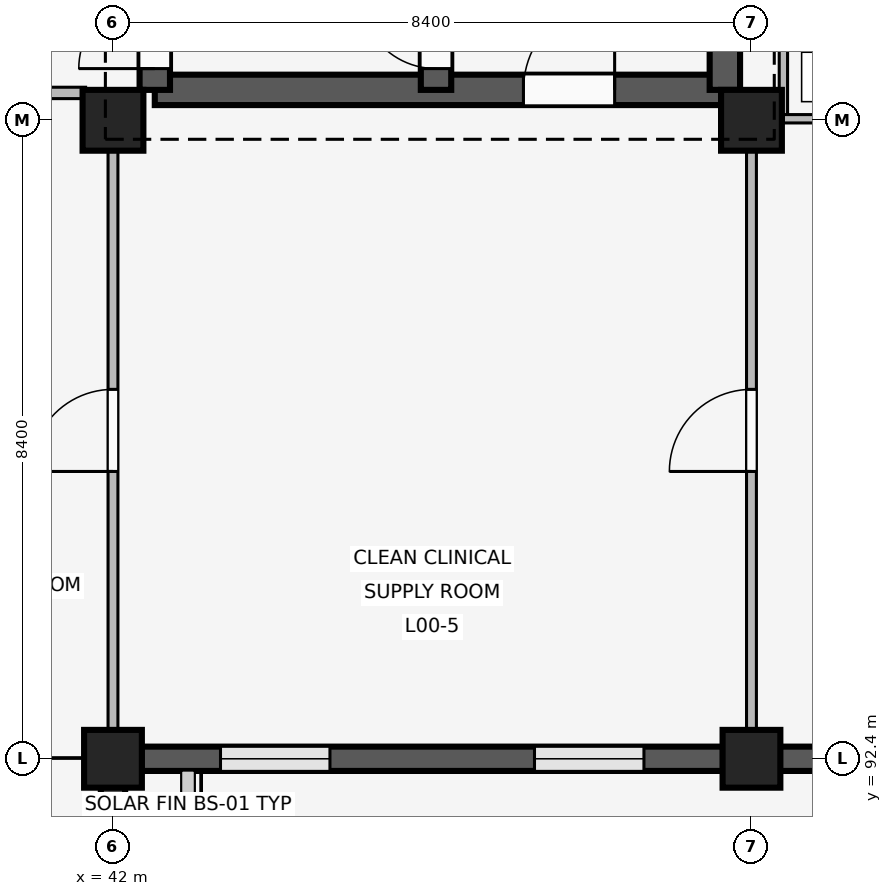
"""IFC4 building model, lengths in metres.
Left out: names, types, materials, properties, quantities, classifications, styles, units other than length and angle.
Written with IfcOpenShell. Run it as: python <this file> out.ifc"""

import sys

from ifc_helpers import new_model, si_unit, direction, frame, frame_2d, origin, origin_2d, place, context, subcontext, project, spatial, rectangle, extrude, element, fill, save


model = new_model("IFC4")
c1 = context("Model", 3, precision=1e-05, world=origin(), true_north=direction((0.0, 1.0)))
c2 = subcontext(c1, "Body", "Model", "MODEL_VIEW")
j1 = project(units=[si_unit("LENGTHUNIT", "METRE"), si_unit("PLANEANGLEUNIT", "RADIAN")], contexts=[c1])
p1 = place(None, origin())
s1 = spatial("IfcSite", under=j1, at=p1, CompositionType="ELEMENT")
p2 = place(p1, origin())
s2 = spatial("IfcBuilding", under=s1, at=p2, CompositionType="ELEMENT")
p3 = place(p2, origin())
s3 = spatial("IfcBuildingStorey", under=s2, at=p3, CompositionType="ELEMENT", Elevation=0.0)
p4 = place(p3, frame((42.0, 92.4, 0.0), z_axis=(0.0, 0.0, 1.0), x_axis=(1.0, 0.0, 0.0)))
e1 = element("IfcColumn", 1, at=p4, inside=s3, PredefinedType="COLUMN", context=c2, shape_type="SweptSolid", body=[
    extrude(rectangle(XDim=0.76, YDim=0.76, at=origin_2d()), origin(), (0.0, 0.0, 1.0), 4.8),
])
p5 = place(p3, frame((42.0, 100.8, 0.0), z_axis=(0.0, 0.0, 1.0), x_axis=(1.0, 0.0, 0.0)))
e2 = element("IfcColumn", 2, at=p5, inside=s3, PredefinedType="COLUMN", context=c2, shape_type="SweptSolid", body=[
    extrude(rectangle(XDim=0.8, YDim=0.8, at=origin_2d()), origin(), (0.0, 0.0, 1.0), 4.8),
])
p6 = place(p3, frame((50.4, 92.4, 0.0), z_axis=(0.0, 0.0, 1.0), x_axis=(1.0, 0.0, 0.0)))
e3 = element("IfcColumn", 3, at=p6, inside=s3, PredefinedType="COLUMN", context=c2, shape_type="SweptSolid", body=[
    extrude(rectangle(XDim=0.76, YDim=0.76, at=origin_2d()), origin(), (0.0, 0.0, 1.0), 4.8),
])
p7 = place(p3, frame((50.4, 100.8, 0.0), z_axis=(0.0, 0.0, 1.0), x_axis=(1.0, 0.0, 0.0)))
e4 = element("IfcColumn", 4, at=p7, inside=s3, PredefinedType="COLUMN", context=c2, shape_type="SweptSolid", body=[
    extrude(rectangle(XDim=0.8, YDim=0.8, at=origin_2d()), origin(), (0.0, 0.0, 1.0), 4.8),
])
p8 = place(p3, frame((42.0, 92.025, 0.0), z_axis=(0.0, 0.0, 1.0), x_axis=(0.0, -1.0, 0.0)))
e5 = element("IfcWall", 5, at=p8, inside=s3, PredefinedType="SOLIDWALL", context=c2, shape_type="SweptSolid", body=[
    extrude(rectangle(XDim=7.65, YDim=0.32, at=frame_2d((3.825, 0.0))), origin(), (0.0, 0.0, 1.0), 3.82),
])
p9 = place(p8, frame((0.979, 0.0, 0.85)))
e6 = element("IfcOpeningElement", 6, at=p9, cuts=e5, PredefinedType="OPENING", context=c2, shape_type="SweptSolid", body=[
    extrude(rectangle(XDim=1.56, YDim=1.7, at=frame_2d((0.78, 0.85))), frame((0.0, 0.17, 0.0), z_axis=(0.0, -1.0, 0.0), x_axis=(1.0, 0.0, 0.0)), (0.0, 0.0, 1.0), 0.34),
])
p10 = place(p8, frame((5.111, 0.0, 0.85)))
e7 = element("IfcOpeningElement", 7, at=p10, cuts=e5, PredefinedType="OPENING", context=c2, shape_type="SweptSolid", body=[
    extrude(rectangle(XDim=1.56, YDim=1.7, at=frame_2d((0.78, 0.85))), frame((0.0, 0.17, 0.0), z_axis=(0.0, -1.0, 0.0), x_axis=(1.0, 0.0, 0.0)), (0.0, 0.0, 1.0), 0.34),
])
p11 = place(p3, frame((50.025, 92.4, 0.0), z_axis=(0.0, 0.0, 1.0), x_axis=(-1.0, 0.0, 0.0)))
e8 = element("IfcWall", 8, at=p11, inside=s3, PredefinedType="SOLIDWALL", context=c2, shape_type="SweptSolid", body=[
    extrude(rectangle(XDim=7.65, YDim=0.32, at=frame_2d((3.825, 0.0))), origin(), (0.0, 0.0, 1.0), 3.82),
])
p12 = place(p11, frame((1.04, 0.0, 0.85)))
e9 = element("IfcOpeningElement", 9, at=p12, cuts=e8, PredefinedType="OPENING", context=c2, shape_type="SweptSolid", body=[
    extrude(rectangle(XDim=1.44, YDim=1.62, at=frame_2d((0.72, 0.81))), frame((0.0, 0.17, 0.0), z_axis=(0.0, -1.0, 0.0), x_axis=(1.0, 0.0, 0.0)), (0.0, 0.0, 1.0), 0.34),
])
p13 = place(p11, frame((5.17, 0.0, 0.85)))
e10 = element("IfcOpeningElement", 10, at=p13, cuts=e8, PredefinedType="OPENING", context=c2, shape_type="SweptSolid", body=[
    extrude(rectangle(XDim=1.44, YDim=1.62, at=frame_2d((0.72, 0.81))), frame((0.0, 0.17, 0.0), z_axis=(0.0, -1.0, 0.0), x_axis=(1.0, 0.0, 0.0)), (0.0, 0.0, 1.0), 0.34),
])
p14 = place(p3, frame((58.425, 92.4, 0.0), z_axis=(0.0, 0.0, 1.0), x_axis=(-1.0, 0.0, 0.0)))
e11 = element("IfcWall", 11, at=p14, inside=s3, PredefinedType="SOLIDWALL", context=c2, shape_type="SweptSolid", body=[
    extrude(rectangle(XDim=7.65, YDim=0.32, at=frame_2d((3.825, 0.0))), origin(), (0.0, 0.0, 1.0), 3.82),
])
p15 = place(p14, frame((1.1, 0.0, 0.85)))
e12 = element("IfcOpeningElement", 12, at=p15, cuts=e11, PredefinedType="OPENING", context=c2, shape_type="SweptSolid", body=[
    extrude(rectangle(XDim=1.32, YDim=1.58, at=frame_2d((0.66, 0.79))), frame((0.0, 0.17, 0.0), z_axis=(0.0, -1.0, 0.0), x_axis=(1.0, 0.0, 0.0)), (0.0, 0.0, 1.0), 0.34),
])
p16 = place(p14, frame((5.23, 0.0, 0.85)))
e13 = element("IfcOpeningElement", 13, at=p16, cuts=e11, PredefinedType="OPENING", context=c2, shape_type="SweptSolid", body=[
    extrude(rectangle(XDim=1.32, YDim=1.58, at=frame_2d((0.66, 0.79))), frame((0.0, 0.17, 0.0), z_axis=(0.0, -1.0, 0.0), x_axis=(1.0, 0.0, 0.0)), (0.0, 0.0, 1.0), 0.34),
])
p17 = place(p3, frame((42.55, 101.2, 0.0), z_axis=(0.0, 0.0, 1.0), x_axis=(1.0, 0.0, 0.0)))
e14 = element("IfcWall", 14, at=p17, inside=s3, PredefinedType="SHEAR", context=c2, shape_type="SweptSolid", body=[
    extrude(rectangle(XDim=7.5, YDim=0.4, at=frame_2d((3.75, 0.0))), origin(), (0.0, 0.0, 1.0), 4.52),
])
p18 = place(p17, frame((4.85, 0.0, 0.0)))
e15 = element("IfcOpeningElement", 15, at=p18, cuts=e14, PredefinedType="OPENING", context=c2, shape_type="SweptSolid", body=[
    extrude(rectangle(XDim=1.2, YDim=2.2, at=frame_2d((0.6, 1.1))), frame((0.0, 0.21, 0.0), z_axis=(0.0, -1.0, 0.0), x_axis=(1.0, 0.0, 0.0)), (0.0, 0.0, 1.0), 0.42),
])
p19 = place(p3, frame((42.55, 101.2, 0.0), z_axis=(0.0, 0.0, 1.0), x_axis=(0.0, 1.0, 0.0)))
e16 = element("IfcWall", 16, at=p19, inside=s3, PredefinedType="SHEAR", context=c2, shape_type="SweptSolid", body=[
    extrude(rectangle(XDim=7.55, YDim=0.4, at=frame_2d((3.775, 0.0))), origin(), (0.0, 0.0, 1.0), 4.52),
])
p20 = place(p19, frame((0.28, 0.0, 0.0)))
e17 = element("IfcOpeningElement", 17, at=p20, cuts=e16, PredefinedType="OPENING", context=c2, shape_type="SweptSolid", body=[
    extrude(rectangle(XDim=1.0, YDim=2.15, at=frame_2d((0.5, 1.075))), frame((0.0, 0.21, 0.0), z_axis=(0.0, -1.0, 0.0), x_axis=(1.0, 0.0, 0.0)), (0.0, 0.0, 1.0), 0.42),
])
p21 = place(p3, frame((50.05, 101.2, 0.0), z_axis=(0.0, 0.0, 1.0), x_axis=(0.0, 1.0, 0.0)))
e18 = element("IfcWall", 18, at=p21, inside=s3, PredefinedType="SHEAR", context=c2, shape_type="SweptSolid", body=[
    extrude(rectangle(XDim=7.55, YDim=0.4, at=frame_2d((3.775, 0.0))), origin(), (0.0, 0.0, 1.0), 4.52),
])
p22 = place(p21, frame((2.4, 0.0, 0.0)))
e19 = element("IfcOpeningElement", 19, at=p22, cuts=e18, PredefinedType="OPENING", context=c2, shape_type="SweptSolid", body=[
    extrude(rectangle(XDim=1.2, YDim=2.2, at=frame_2d((0.6, 1.1))), frame((0.0, 0.21, 0.0), z_axis=(0.0, -1.0, 0.0), x_axis=(1.0, 0.0, 0.0)), (0.0, 0.0, 1.0), 0.42),
])
p23 = place(p3, frame((46.25, 101.2, 0.0), z_axis=(0.0, 0.0, 1.0), x_axis=(0.0, 1.0, 0.0)))
e20 = element("IfcWall", 20, at=p23, inside=s3, PredefinedType="SHEAR", context=c2, shape_type="SweptSolid", body=[
    extrude(rectangle(XDim=7.55, YDim=0.4, at=frame_2d((3.775, 0.0))), origin(), (0.0, 0.0, 1.0), 4.52),
])
p24 = place(p23, frame((0.28, 0.0, 0.0)))
e21 = element("IfcOpeningElement", 21, at=p24, cuts=e20, PredefinedType="OPENING", context=c2, shape_type="SweptSolid", body=[
    extrude(rectangle(XDim=1.0, YDim=2.15, at=frame_2d((0.5, 1.075))), frame((0.0, 0.21, 0.0), z_axis=(0.0, -1.0, 0.0), x_axis=(1.0, 0.0, 0.0)), (0.0, 0.0, 1.0), 0.42),
])
p25 = place(p3, frame((39.46, 101.16, 0.0), z_axis=(0.0, 0.0, 1.0), x_axis=(1.0, 0.0, 0.0)))
e22 = element("IfcWall", 22, at=p25, inside=s3, PredefinedType="PARTITIONING", context=c2, shape_type="SweptSolid", body=[
    extrude(rectangle(XDim=2.18, YDim=0.15, at=frame_2d((1.09, 0.0))), origin(), (0.0, 0.0, 1.0), 3.8),
])
p26 = place(p25, frame((0.5, 0.0, 0.0)))
e23 = element("IfcOpeningElement", 23, at=p26, cuts=e22, PredefinedType="OPENING", context=c2, shape_type="SweptSolid", body=[
    extrude(rectangle(XDim=1.08, YDim=2.15, at=frame_2d((0.54, 1.075))), frame((0.0, 0.085, 0.0), z_axis=(0.0, -1.0, 0.0), x_axis=(1.0, 0.0, 0.0)), (0.0, 0.0, 1.0), 0.17),
])
p27 = place(p3, frame((42.0, 92.54, 0.0), z_axis=(0.0, 0.0, 1.0), x_axis=(0.0, 1.0, 0.0)))
e24 = element("IfcWall", 24, at=p27, inside=s3, PredefinedType="PARTITIONING", context=c2, shape_type="SweptSolid", body=[
    extrude(rectangle(XDim=8.21, YDim=0.13, at=frame_2d((4.105, 0.0))), origin(), (0.0, 0.0, 1.0), 3.8),
])
p28 = place(p27, frame((3.64, 0.0, 0.0)))
e25 = element("IfcOpeningElement", 25, at=p28, cuts=e24, PredefinedType="OPENING", context=c2, shape_type="SweptSolid", body=[
    extrude(rectangle(XDim=1.08, YDim=2.15, at=frame_2d((0.54, 1.075))), frame((0.0, 0.075, 0.0), z_axis=(0.0, -1.0, 0.0), x_axis=(1.0, 0.0, 0.0)), (0.0, 0.0, 1.0), 0.15),
])
p29 = place(p3, frame((50.4, 92.54, 0.0), z_axis=(0.0, 0.0, 1.0), x_axis=(0.0, 1.0, 0.0)))
e26 = element("IfcWall", 26, at=p29, inside=s3, PredefinedType="PARTITIONING", context=c2, shape_type="SweptSolid", body=[
    extrude(rectangle(XDim=8.21, YDim=0.13, at=frame_2d((4.105, 0.0))), origin(), (0.0, 0.0, 1.0), 3.8),
])
p30 = place(p29, frame((3.64, 0.0, 0.0)))
e27 = element("IfcOpeningElement", 27, at=p30, cuts=e26, PredefinedType="OPENING", context=c2, shape_type="SweptSolid", body=[
    extrude(rectangle(XDim=1.08, YDim=2.15, at=frame_2d((0.54, 1.075))), frame((0.0, 0.075, 0.0), z_axis=(0.0, -1.0, 0.0), x_axis=(1.0, 0.0, 0.0)), (0.0, 0.0, 1.0), 0.15),
])
p31 = place(p3, frame((50.82, 100.82, 0.0), z_axis=(0.0, 0.0, 1.0), x_axis=(0.0, 1.0, 0.0)))
e28 = element("IfcWall", 28, at=p31, inside=s3, PredefinedType="PARTITIONING", context=c2, shape_type="SweptSolid", body=[
    extrude(rectangle(XDim=2.61, YDim=0.11, at=frame_2d((1.305, 0.0))), origin(), (0.0, 0.0, 1.0), 3.8),
])
p32 = place(p3, frame((50.82, 100.82, 0.0), z_axis=(0.0, 0.0, 1.0), x_axis=(1.0, 0.0, 0.0)))
e29 = element("IfcWall", 29, at=p32, inside=s3, PredefinedType="PARTITIONING", context=c2, shape_type="SweptSolid", body=[
    extrude(rectangle(XDim=1.98, YDim=0.11, at=frame_2d((0.99, 0.0))), origin(), (0.0, 0.0, 1.0), 3.8),
])
p33 = place(p32, frame((0.54, 0.0, 0.0)))
e30 = element("IfcOpeningElement", 30, at=p33, cuts=e29, PredefinedType="OPENING", context=c2, shape_type="SweptSolid", body=[
    extrude(rectangle(XDim=0.9, YDim=2.1, at=frame_2d((0.45, 1.05))), frame((0.0, 0.065, 0.0), z_axis=(0.0, -1.0, 0.0), x_axis=(1.0, 0.0, 0.0)), (0.0, 0.0, 1.0), 0.13),
])
p34 = place(p12, origin())
e31 = element("IfcWindow", 31, at=p34, inside=s3, PartitioningType="SINGLE_PANEL", PredefinedType="WINDOW", context=c2, shape_type="SweptSolid", body=[
    extrude(rectangle(XDim=1.44, YDim=1.62, at=frame_2d((0.72, 0.81))), frame((0.0, 0.03, 0.0), z_axis=(0.0, -1.0, 0.0), x_axis=(1.0, 0.0, 0.0)), (0.0, 0.0, 1.0), 0.06),
])
fill(e9, e31)
p35 = place(p13, origin())
e32 = element("IfcWindow", 32, at=p35, inside=s3, PartitioningType="SINGLE_PANEL", PredefinedType="WINDOW", context=c2, shape_type="SweptSolid", body=[
    extrude(rectangle(XDim=1.44, YDim=1.62, at=frame_2d((0.72, 0.81))), frame((0.0, 0.03, 0.0), z_axis=(0.0, -1.0, 0.0), x_axis=(1.0, 0.0, 0.0)), (0.0, 0.0, 1.0), 0.06),
])
fill(e10, e32)
p36 = place(p18, origin())
e33 = element("IfcDoor", 33, at=p36, inside=s3, OperationType="SINGLE_SWING_RIGHT", PredefinedType="DOOR", context=c2, shape_type="SweptSolid", body=[
    extrude(rectangle(XDim=1.2, YDim=2.2, at=frame_2d((0.6, 1.1))), frame((0.0, 0.025, 0.0), z_axis=(0.0, -1.0, 0.0), x_axis=(1.0, 0.0, 0.0)), (0.0, 0.0, 1.0), 0.05),
])
fill(e15, e33)
p37 = place(p20, origin())
e34 = element("IfcDoor", 34, at=p37, inside=s3, OperationType="SINGLE_SWING_LEFT", PredefinedType="DOOR", context=c2, shape_type="SweptSolid", body=[
    extrude(rectangle(XDim=1.0, YDim=2.15, at=frame_2d((0.5, 1.075))), frame((0.0, 0.025, 0.0), z_axis=(0.0, -1.0, 0.0), x_axis=(1.0, 0.0, 0.0)), (0.0, 0.0, 1.0), 0.05),
])
fill(e17, e34)
p38 = place(p24, origin())
e35 = element("IfcDoor", 35, at=p38, inside=s3, OperationType="SINGLE_SWING_RIGHT", PredefinedType="DOOR", context=c2, shape_type="SweptSolid", body=[
    extrude(rectangle(XDim=1.0, YDim=2.15, at=frame_2d((0.5, 1.075))), frame((0.0, 0.025, 0.0), z_axis=(0.0, -1.0, 0.0), x_axis=(1.0, 0.0, 0.0)), (0.0, 0.0, 1.0), 0.05),
])
fill(e21, e35)
p39 = place(p28, origin())
e36 = element("IfcDoor", 36, at=p39, inside=s3, OperationType="SINGLE_SWING_LEFT", PredefinedType="DOOR", context=c2, shape_type="SweptSolid", body=[
    extrude(rectangle(XDim=1.08, YDim=2.15, at=frame_2d((0.54, 1.075))), frame((0.0, 0.025, 0.0), z_axis=(0.0, -1.0, 0.0), x_axis=(1.0, 0.0, 0.0)), (0.0, 0.0, 1.0), 0.05),
])
fill(e25, e36)
p40 = place(p30, origin())
e37 = element("IfcDoor", 37, at=p40, inside=s3, OperationType="SINGLE_SWING_LEFT", PredefinedType="DOOR", context=c2, shape_type="SweptSolid", body=[
    extrude(rectangle(XDim=1.08, YDim=2.15, at=frame_2d((0.54, 1.075))), frame((0.0, 0.025, 0.0), z_axis=(0.0, -1.0, 0.0), x_axis=(1.0, 0.0, 0.0)), (0.0, 0.0, 1.0), 0.05),
])
fill(e27, e37)
save(model, sys.argv[1])
